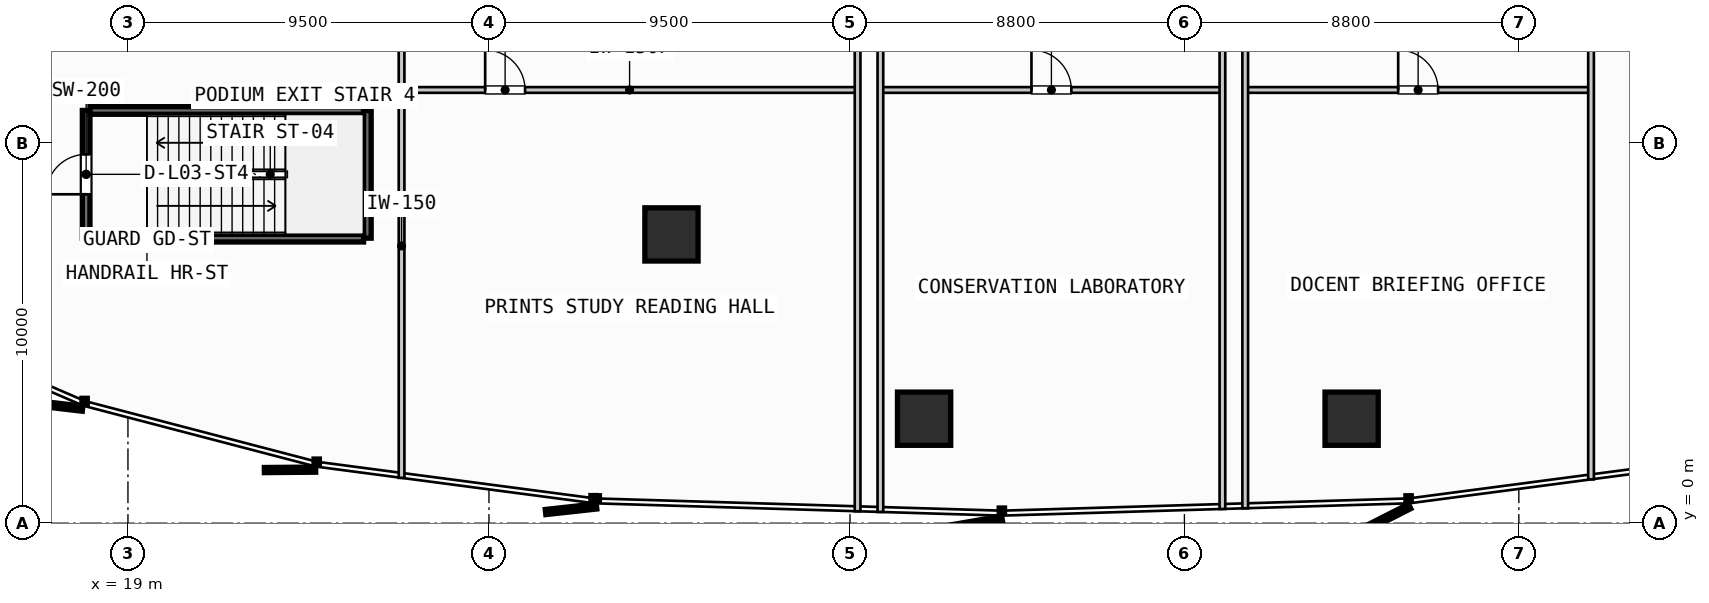
"""IFC4 building model, lengths in metres.
Left out: names, types, materials, properties, quantities, classifications, styles, units other than length and angle.
Written with IfcOpenShell. Run it as: python <this file> out.ifc"""

import sys

from ifc_helpers import new_model, si_unit, direction, frame, frame_2d, origin, origin_2d, place, context, subcontext, project, spatial, rectangle, hollow_rectangle, extrude, source, transform, mapped, element, fill, save


model = new_model("IFC4")
c1 = context("Model", 3, precision=1e-05, world=origin(), true_north=direction((0.0, 1.0)))
c2 = subcontext(c1, "Body", "Model", "MODEL_VIEW")
j1 = project(units=[si_unit("LENGTHUNIT", "METRE"), si_unit("PLANEANGLEUNIT", "RADIAN")], contexts=[c1])
p1 = place(None, origin())
s1 = spatial("IfcSite", under=j1, at=p1, CompositionType="ELEMENT")
p2 = place(p1, origin())
s2 = spatial("IfcBuilding", under=s1, at=p2, CompositionType="ELEMENT")
p3 = place(p2, frame((0.0, 0.0, 14.8)))
s3 = spatial("IfcBuildingStorey", under=s2, at=p3, CompositionType="ELEMENT", Elevation=14.8)
m1 = source(origin(), c2, "Body", "SweptSolid", [
    extrude(hollow_rectangle(XDim=1.4, YDim=1.4, WallThickness=0.05, InnerFilletRadius=0.025, OuterFilletRadius=0.075, at=origin_2d()), origin(), (0.0, 0.0, 1.0), 4.53),
])
for number, where, z_axis, x_axis in (
    (1, (33.302, 7.599, 0.0), (0.0, 0.0, 1.0), (1.0, 0.0, 0.0)),
    (2, (39.95, 2.75, 0.0), (0.0, 0.0, 1.0), (1.0, 0.0, 0.0)),
    (3, (51.2, 2.75, 0.0), (0.0, 0.0, 1.0), (1.0, 0.0, 0.0)),
):
    element("IfcColumn", number, at=place(p3, frame(where, z_axis=z_axis, x_axis=x_axis)), inside=s3, PredefinedType="COLUMN", context=c2, shape_type="MappedRepresentation", body=[
        mapped(m1, transform((0.0, 0.0, 0.0), scale=1.0)),
    ])
p4 = place(p3, frame((17.9, 7.5, 0.0), z_axis=(0.0, 0.0, 1.0), x_axis=(0.0, 1.0, 0.0)))
e4 = element("IfcWall", 4, at=p4, inside=s3, PredefinedType="SHEAR", context=c2, shape_type="SweptSolid", body=[
    extrude(rectangle(XDim=3.36, YDim=0.2, at=frame_2d((1.68, 0.0))), origin(), (0.0, 0.0, 1.0), 4.53),
])
p5 = place(p4, frame((1.155, 0.0, 0.0)))
e5 = element("IfcOpeningElement", 5, at=p5, cuts=e4, PredefinedType="OPENING", context=c2, shape_type="SweptSolid", body=[
    extrude(rectangle(XDim=1.05, YDim=2.15, at=frame_2d((0.525, 1.075))), frame((0.0, 0.11, 0.0), z_axis=(0.0, -1.0, 0.0), x_axis=(1.0, 0.0, 0.0)), (0.0, 0.0, 1.0), 0.22),
])
p6 = place(p3, frame((25.3, 10.86, 0.0), z_axis=(0.0, 0.0, 1.0), x_axis=(0.0, -1.0, 0.0)))
e6 = element("IfcWall", 6, at=p6, inside=s3, PredefinedType="SHEAR", context=c2, shape_type="SweptSolid", body=[
    extrude(rectangle(XDim=3.36, YDim=0.2, at=frame_2d((1.68, 0.0))), origin(), (0.0, 0.0, 1.0), 4.53),
])
for number, where, z_axis, x_axis in (
    (7, (25.2, 7.5, 0.0), (0.0, 0.0, 1.0), (-1.0, 0.0, 0.0)),
    (8, (18.0, 10.86, 0.0), (0.0, 0.0, 1.0), (1.0, 0.0, 0.0)),
):
    element("IfcWall", number, at=place(p3, frame(where, z_axis=z_axis, x_axis=x_axis)), inside=s3, PredefinedType="SHEAR", context=c2, shape_type="SweptSolid", body=[
        extrude(rectangle(XDim=7.2, YDim=0.2, at=frame_2d((3.6, 0.0))), origin(), (0.0, 0.0, 1.0), 4.53),
    ])
p7 = place(p3, frame((26.2, 11.4, 0.0), z_axis=(0.0, 0.0, 1.0), x_axis=(1.0, 0.0, 0.0)))
e9 = element("IfcWall", 9, at=p7, inside=s3, PredefinedType="PARTITIONING", context=c2, shape_type="SweptSolid", body=[
    extrude(rectangle(XDim=12.0, YDim=0.15, at=frame_2d((6.0, 0.0))), origin(), (0.0, 0.0, 1.0), 3.743),
])
p8 = place(p7, frame((2.2, 0.0, 0.0)))
e10 = element("IfcOpeningElement", 10, at=p8, cuts=e9, PredefinedType="OPENING", context=c2, shape_type="SweptSolid", body=[
    extrude(rectangle(XDim=1.05, YDim=2.15, at=frame_2d((0.525, 1.075))), frame((0.0, 0.085, 0.0), z_axis=(0.0, -1.0, 0.0), x_axis=(1.0, 0.0, 0.0)), (0.0, 0.0, 1.0), 0.17),
])
p9 = place(p3, frame((26.2, 1.193, 0.0), z_axis=(0.0, 0.0, 1.0), x_axis=(0.0, 1.0, 0.0)))
e11 = element("IfcWall", 11, at=p9, inside=s3, PredefinedType="PARTITIONING", context=c2, shape_type="SweptSolid", body=[
    extrude(rectangle(XDim=12.207, YDim=0.15, at=frame_2d((6.104, 0.0))), origin(), (0.0, 0.0, 1.0), 3.743),
])
p10 = place(p3, frame((38.2, 0.315, 0.0), z_axis=(0.0, 0.0, 1.0), x_axis=(0.0, 1.0, 0.0)))
e12 = element("IfcWall", 12, at=p10, inside=s3, PredefinedType="PARTITIONING", context=c2, shape_type="SweptSolid", body=[
    extrude(rectangle(XDim=13.085, YDim=0.15, at=frame_2d((6.542, 0.0))), origin(), (0.0, 0.0, 1.0), 3.743),
])
p11 = place(p3, frame((38.8, 11.4, 0.0), z_axis=(0.0, 0.0, 1.0), x_axis=(1.0, 0.0, 0.0)))
e13 = element("IfcWall", 13, at=p11, inside=s3, PredefinedType="PARTITIONING", context=c2, shape_type="SweptSolid", body=[
    extrude(rectangle(XDim=9.0, YDim=0.15, at=frame_2d((4.5, 0.0))), origin(), (0.0, 0.0, 1.0), 3.743),
])
p12 = place(p11, frame((3.975, 0.0, 0.0)))
e14 = element("IfcOpeningElement", 14, at=p12, cuts=e13, PredefinedType="OPENING", context=c2, shape_type="SweptSolid", body=[
    extrude(rectangle(XDim=1.05, YDim=2.15, at=frame_2d((0.525, 1.075))), frame((0.0, 0.085, 0.0), z_axis=(0.0, -1.0, 0.0), x_axis=(1.0, 0.0, 0.0)), (0.0, 0.0, 1.0), 0.17),
])
p13 = place(p3, frame((38.8, 0.296, 0.0), z_axis=(0.0, 0.0, 1.0), x_axis=(0.0, 1.0, 0.0)))
e15 = element("IfcWall", 15, at=p13, inside=s3, PredefinedType="PARTITIONING", context=c2, shape_type="SweptSolid", body=[
    extrude(rectangle(XDim=13.104, YDim=0.15, at=frame_2d((6.552, 0.0))), origin(), (0.0, 0.0, 1.0), 3.743),
])
p14 = place(p3, frame((47.8, 0.375, 0.0), z_axis=(0.0, 0.0, 1.0), x_axis=(0.0, 1.0, 0.0)))
e16 = element("IfcWall", 16, at=p14, inside=s3, PredefinedType="PARTITIONING", context=c2, shape_type="SweptSolid", body=[
    extrude(rectangle(XDim=13.025, YDim=0.15, at=frame_2d((6.512, 0.0))), origin(), (0.0, 0.0, 1.0), 3.743),
])
p15 = place(p3, frame((48.4, 11.4, 0.0), z_axis=(0.0, 0.0, 1.0), x_axis=(1.0, 0.0, 0.0)))
e17 = element("IfcWall", 17, at=p15, inside=s3, PredefinedType="PARTITIONING", context=c2, shape_type="SweptSolid", body=[
    extrude(rectangle(XDim=9.1, YDim=0.15, at=frame_2d((4.55, 0.0))), origin(), (0.0, 0.0, 1.0), 3.743),
])
p16 = place(p15, frame((4.025, 0.0, 0.0)))
e18 = element("IfcOpeningElement", 18, at=p16, cuts=e17, PredefinedType="OPENING", context=c2, shape_type="SweptSolid", body=[
    extrude(rectangle(XDim=1.05, YDim=2.15, at=frame_2d((0.525, 1.075))), frame((0.0, 0.085, 0.0), z_axis=(0.0, -1.0, 0.0), x_axis=(1.0, 0.0, 0.0)), (0.0, 0.0, 1.0), 0.17),
])
p17 = place(p3, frame((48.4, 0.393, 0.0), z_axis=(0.0, 0.0, 1.0), x_axis=(0.0, 1.0, 0.0)))
e19 = element("IfcWall", 19, at=p17, inside=s3, PredefinedType="PARTITIONING", context=c2, shape_type="SweptSolid", body=[
    extrude(rectangle(XDim=13.007, YDim=0.15, at=frame_2d((6.503, 0.0))), origin(), (0.0, 0.0, 1.0), 3.743),
])
p18 = place(p3, frame((57.5, 1.154, 0.0), z_axis=(0.0, 0.0, 1.0), x_axis=(0.0, 1.0, 0.0)))
e20 = element("IfcWall", 20, at=p18, inside=s3, PredefinedType="PARTITIONING", context=c2, shape_type="SweptSolid", body=[
    extrude(rectangle(XDim=12.246, YDim=0.15, at=frame_2d((6.123, 0.0))), origin(), (0.0, 0.0, 1.0), 3.743),
])
m2 = source(origin(), c2, "Body", "SweptSolid", [
    extrude(rectangle(XDim=1.05, YDim=2.15, at=frame_2d((0.525, 1.075))), frame((0.0, 0.025, 0.0), z_axis=(0.0, -1.0, 0.0), x_axis=(1.0, 0.0, 0.0)), (0.0, 0.0, 1.0), 0.05),
])
p19 = place(p5, origin())
e21 = element("IfcDoor", 21, at=p19, inside=s3, OperationType="SINGLE_SWING_LEFT", PredefinedType="DOOR", context=c2, shape_type="MappedRepresentation", body=[
    mapped(m2, transform((0.0, 0.0, 0.0), scale=1.0)),
])
fill(e5, e21)
p20 = place(p8, origin())
e22 = element("IfcDoor", 22, at=p20, inside=s3, OperationType="SINGLE_SWING_LEFT", PredefinedType="DOOR", context=c2, shape_type="MappedRepresentation", body=[
    mapped(m2, transform((0.0, 0.0, 0.0), scale=1.0)),
])
fill(e10, e22)
p21 = place(p12, origin())
e23 = element("IfcDoor", 23, at=p21, inside=s3, OperationType="SINGLE_SWING_LEFT", PredefinedType="DOOR", context=c2, shape_type="MappedRepresentation", body=[
    mapped(m2, transform((0.0, 0.0, 0.0), scale=1.0)),
])
fill(e14, e23)
p22 = place(p16, origin())
e24 = element("IfcDoor", 24, at=p22, inside=s3, OperationType="SINGLE_SWING_LEFT", PredefinedType="DOOR", context=c2, shape_type="MappedRepresentation", body=[
    mapped(m2, transform((0.0, 0.0, 0.0), scale=1.0)),
])
fill(e18, e24)
save(model, sys.argv[1])
